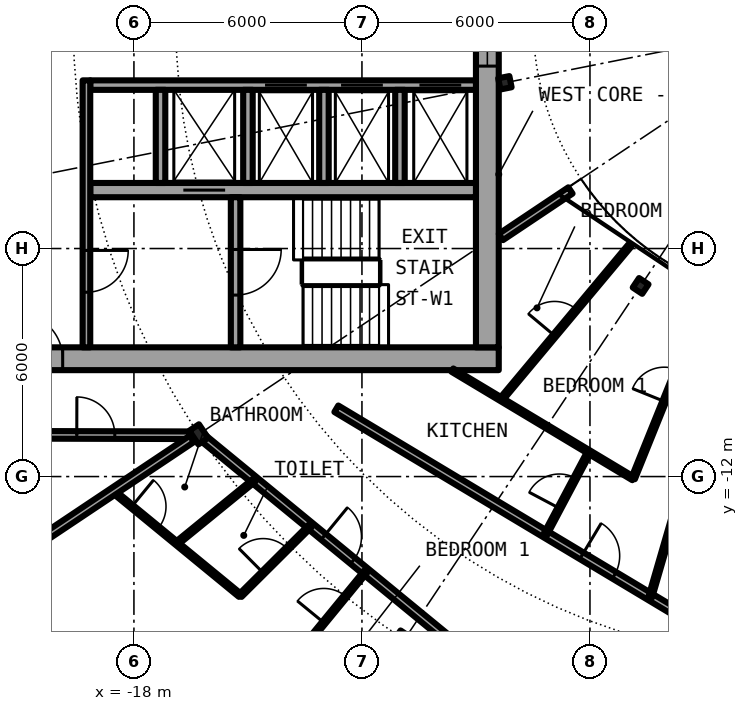
"""IFC4 building model, lengths in metres.
Left out: names, types, materials, properties, quantities, classifications, styles, units other than length and angle.
Written with IfcOpenShell. Run it as: python <this file> out.ifc"""

import sys

from ifc_helpers import new_model, si_unit, direction, frame, frame_2d, origin, origin_2d, place, context, subcontext, project, spatial, rectangle, i_section, extrude, element, fill, save


model = new_model("IFC4")
c1 = context("Model", 3, precision=1e-05, world=origin(), true_north=direction((0.0, 1.0)))
c2 = subcontext(c1, "Body", "Model", "MODEL_VIEW")
j1 = project(units=[si_unit("LENGTHUNIT", "METRE"), si_unit("PLANEANGLEUNIT", "RADIAN")], contexts=[c1])
p1 = place(None, origin())
s1 = spatial("IfcSite", under=j1, at=p1, CompositionType="ELEMENT")
p2 = place(p1, origin())
s2 = spatial("IfcBuilding", under=s1, at=p2, CompositionType="ELEMENT")
p3 = place(p2, frame((0.0, 0.0, 129.95)))
s3 = spatial("IfcBuildingStorey", under=s2, at=p3, CompositionType="ELEMENT", Elevation=129.95)
for number, where, z_axis, x_axis in (
    (1, (-16.297, -10.889, 0.0), (0.0, 0.0, 1.0), (-0.831, -0.556, 0.0)),
    (2, (-10.889, -16.297, 0.0), (0.0, 0.0, 1.0), (-0.556, -0.831, 0.0)),
):
    element("IfcColumn", number, at=place(p3, frame(where, z_axis=z_axis, x_axis=x_axis)), inside=s3, PredefinedType="COLUMN", context=c2, shape_type="SweptSolid", body=[
        extrude(i_section(OverallWidth=0.307, OverallDepth=0.432, WebThickness=0.021, FlangeThickness=0.04, FilletRadius=0.027, at=origin_2d()), origin(), (0.0, 0.0, 1.0), 3.05),
    ])
for number, where, z_axis, x_axis in (
    (3, (-8.239, -1.639, 0.0), (0.0, 0.0, 1.0), (-0.981, -0.195, 0.0)),
    (4, (-4.667, -6.984, 0.0), (0.0, 0.0, 1.0), (-0.556, -0.831, 0.0)),
):
    element("IfcColumn", number, at=place(p3, frame(where, z_axis=z_axis, x_axis=x_axis)), inside=s3, PredefinedType="COLUMN", context=c2, shape_type="SweptSolid", body=[
        extrude(i_section(OverallWidth=0.3, OverallDepth=0.3, WebThickness=0.011, FlangeThickness=0.019, FilletRadius=0.027, at=origin_2d()), origin(), (0.0, 0.0, 1.0), 3.05),
    ])
p4 = place(p3, frame((-22.699, -15.167, 0.0), z_axis=(0.0, 0.0, 1.0), x_axis=(0.634382322723, -0.773019449054, 0.0)))
e5 = element("IfcWall", 5, at=p4, inside=s3, PredefinedType="SOLIDWALL", context=c2, shape_type="SweptSolid", body=[
    extrude(rectangle(XDim=5.352, YDim=0.25, at=frame_2d((2.676, 0.0))), origin(), (0.0, 0.0, 1.0), 2.7),
])
p5 = place(p4, frame((0.441, 0.0, 0.3)))
e6 = element("IfcOpeningElement", 6, at=p5, cuts=e5, PredefinedType="OPENING", context=c2, shape_type="SweptSolid", body=[
    extrude(rectangle(XDim=1.8, YDim=2.1, at=frame_2d((0.9, 1.05))), frame((0.0, 0.135, 0.0), z_axis=(0.0, -1.0, 0.0), x_axis=(1.0, 0.0, 0.0)), (0.0, 0.0, 1.0), 0.27),
])
p6 = place(p4, frame((3.51, 0.0, 0.0)))
e7 = element("IfcOpeningElement", 7, at=p6, cuts=e5, PredefinedType="OPENING", context=c2, shape_type="SweptSolid", body=[
    extrude(rectangle(XDim=1.0, YDim=2.2, at=frame_2d((0.5, 1.1))), frame((0.0, 0.135, 0.0), z_axis=(0.0, -1.0, 0.0), x_axis=(1.0, 0.0, 0.0)), (0.0, 0.0, 1.0), 0.27),
])
p7 = place(p3, frame((-22.2, -8.9, 0.0), z_axis=(0.0, 0.0, 1.0), x_axis=(1.0, 0.0, 0.0)))
e8 = element("IfcWall", 8, at=p7, inside=s3, PredefinedType="SHEAR", context=c2, shape_type="SweptSolid", body=[
    extrude(rectangle(XDim=13.8, YDim=0.6, at=frame_2d((6.9, 0.0))), origin(), (0.0, 0.0, 1.0), 3.05),
])
p8 = place(p7, frame((1.125, 0.0, 0.0)))
e9 = element("IfcOpeningElement", 9, at=p8, cuts=e8, PredefinedType="OPENING", context=c2, shape_type="SweptSolid", body=[
    extrude(rectangle(XDim=1.2, YDim=2.3, at=frame_2d((0.6, 1.15))), frame((0.0, 0.31, 0.0), z_axis=(0.0, -1.0, 0.0), x_axis=(1.0, 0.0, 0.0)), (0.0, 0.0, 1.0), 0.62),
])
p9 = place(p3, frame((-8.7, 8.6, 0.0), z_axis=(0.0, 0.0, 1.0), x_axis=(0.0, -1.0, 0.0)))
e10 = element("IfcWall", 10, at=p9, inside=s3, PredefinedType="SHEAR", context=c2, shape_type="SweptSolid", body=[
    extrude(rectangle(XDim=17.2, YDim=0.6, at=frame_2d((8.6, 0.0))), origin(), (0.0, 0.0, 1.0), 3.05),
])
p10 = place(p9, frame((7.4, 0.0, 0.1)))
e11 = element("IfcOpeningElement", 11, at=p10, cuts=e10, PredefinedType="OPENING", context=c2, shape_type="SweptSolid", body=[
    extrude(rectangle(XDim=2.4, YDim=2.2, at=frame_2d((1.2, 1.1))), frame((0.0, 0.31, 0.0), z_axis=(0.0, -1.0, 0.0), x_axis=(1.0, 0.0, 0.0)), (0.0, 0.0, 1.0), 0.62),
])
p11 = place(p3, frame((-9.0, -1.7, 0.0), z_axis=(0.0, 0.0, 1.0), x_axis=(-1.0, 0.0, 0.0)))
e12 = element("IfcWall", 12, at=p11, inside=s3, PredefinedType="SHEAR", context=c2, shape_type="SweptSolid", body=[
    extrude(rectangle(XDim=10.15, YDim=0.25, at=frame_2d((5.075, 0.0))), origin(), (0.0, 0.0, 1.0), 3.05),
])
p12 = place(p11, frame((0.387, 0.0, 0.0)))
e13 = element("IfcOpeningElement", 13, at=p12, cuts=e12, PredefinedType="OPENING", context=c2, shape_type="SweptSolid", body=[
    extrude(rectangle(XDim=1.1, YDim=2.3, at=frame_2d((0.55, 1.15))), frame((0.0, 0.135, 0.0), z_axis=(0.0, -1.0, 0.0), x_axis=(1.0, 0.0, 0.0)), (0.0, 0.0, 1.0), 0.27),
])
p13 = place(p11, frame((2.45, 0.0, 0.0)))
e14 = element("IfcOpeningElement", 14, at=p13, cuts=e12, PredefinedType="OPENING", context=c2, shape_type="SweptSolid", body=[
    extrude(rectangle(XDim=1.1, YDim=2.3, at=frame_2d((0.55, 1.15))), frame((0.0, 0.135, 0.0), z_axis=(0.0, -1.0, 0.0), x_axis=(1.0, 0.0, 0.0)), (0.0, 0.0, 1.0), 0.27),
])
p14 = place(p11, frame((4.45, 0.0, 0.0)))
e15 = element("IfcOpeningElement", 15, at=p14, cuts=e12, PredefinedType="OPENING", context=c2, shape_type="SweptSolid", body=[
    extrude(rectangle(XDim=1.1, YDim=2.3, at=frame_2d((0.55, 1.15))), frame((0.0, 0.135, 0.0), z_axis=(0.0, -1.0, 0.0), x_axis=(1.0, 0.0, 0.0)), (0.0, 0.0, 1.0), 0.27),
])
p15 = place(p3, frame((-9.0, -4.462, 0.0), z_axis=(0.0, 0.0, 1.0), x_axis=(-1.0, 0.0, 0.0)))
e16 = element("IfcWall", 16, at=p15, inside=s3, PredefinedType="SHEAR", context=c2, shape_type="SweptSolid", body=[
    extrude(rectangle(XDim=10.15, YDim=0.375, at=frame_2d((5.075, 0.0))), origin(), (0.0, 0.0, 1.0), 3.05),
])
p16 = place(p15, frame((6.6, 0.0, 0.0)))
e17 = element("IfcOpeningElement", 17, at=p16, cuts=e16, PredefinedType="OPENING", context=c2, shape_type="SweptSolid", body=[
    extrude(rectangle(XDim=1.1, YDim=2.3, at=frame_2d((0.55, 1.15))), frame((0.0, 0.198, 0.0), z_axis=(0.0, -1.0, 0.0), x_axis=(1.0, 0.0, 0.0)), (0.0, 0.0, 1.0), 0.395),
])
p17 = place(p3, frame((-15.325, -4.65, 0.0), z_axis=(0.0, 0.0, 1.0), x_axis=(0.0, -1.0, 0.0)))
e18 = element("IfcWall", 18, at=p17, inside=s3, PredefinedType="SHEAR", context=c2, shape_type="SweptSolid", body=[
    extrude(rectangle(XDim=3.95, YDim=0.25, at=frame_2d((1.975, 0.0))), origin(), (0.0, 0.0, 1.0), 3.05),
])
p18 = place(p17, frame((1.375, 0.0, 0.0)))
e19 = element("IfcOpeningElement", 19, at=p18, cuts=e18, PredefinedType="OPENING", context=c2, shape_type="SweptSolid", body=[
    extrude(rectangle(XDim=1.2, YDim=2.3, at=frame_2d((0.6, 1.15))), frame((0.0, 0.135, 0.0), z_axis=(0.0, -1.0, 0.0), x_axis=(1.0, 0.0, 0.0)), (0.0, 0.0, 1.0), 0.27),
])
for number, where, z_axis, x_axis in (
    (20, (-15.0, -1.825, 0.0), (0.0, 0.0, 1.0), (0.0, -1.0, 0.0)),
    (21, (-17.3, -1.825, 0.0), (0.0, 0.0, 1.0), (0.0, -1.0, 0.0)),
):
    element("IfcWall", number, at=place(p3, frame(where, z_axis=z_axis, x_axis=x_axis)), inside=s3, PredefinedType="SOLIDWALL", context=c2, shape_type="SweptSolid", body=[
        extrude(rectangle(XDim=2.45, YDim=0.25, at=frame_2d((1.225, 0.0))), origin(), (0.0, 0.0, 1.0), 2.7),
    ])
p19 = place(p3, frame((-19.25, -1.575, 0.0), z_axis=(0.0, 0.0, 1.0), x_axis=(0.0, -1.0, 0.0)))
e22 = element("IfcWall", 22, at=p19, inside=s3, PredefinedType="SOLIDWALL", context=c2, shape_type="SweptSolid", body=[
    extrude(rectangle(XDim=7.025, YDim=0.2, at=frame_2d((3.513, 0.0))), origin(), (0.0, 0.0, 1.0), 2.7),
])
p20 = place(p19, frame((4.475, 0.0, 0.0)))
e23 = element("IfcOpeningElement", 23, at=p20, cuts=e22, PredefinedType="OPENING", context=c2, shape_type="SweptSolid", body=[
    extrude(rectangle(XDim=1.1, YDim=2.3, at=frame_2d((0.55, 1.15))), frame((0.0, 0.11, 0.0), z_axis=(0.0, -1.0, 0.0), x_axis=(1.0, 0.0, 0.0)), (0.0, 0.0, 1.0), 0.22),
])
for number, where, z_axis, x_axis in (
    (24, (-11.0, -1.825, 0.0), (0.0, 0.0, 1.0), (0.0, -1.0, 0.0)),
    (25, (-13.0, -1.825, 0.0), (0.0, 0.0, 1.0), (0.0, -1.0, 0.0)),
):
    element("IfcWall", number, at=place(p3, frame(where, z_axis=z_axis, x_axis=x_axis)), inside=s3, PredefinedType="SOLIDWALL", context=c2, shape_type="SweptSolid", body=[
        extrude(rectangle(XDim=2.45, YDim=0.25, at=frame_2d((1.225, 0.0))), origin(), (0.0, 0.0, 1.0), 2.7),
    ])
p21 = place(p3, frame((-18.542, -12.389, 0.0), z_axis=(0.0, 0.0, 1.0), x_axis=(0.772975913823, -0.634435368379, 0.0)))
e26 = element("IfcWall", 26, at=p21, inside=s3, PredefinedType="PARTITIONING", context=c2, shape_type="SweptSolid", body=[
    extrude(rectangle(XDim=4.316, YDim=0.1, at=frame_2d((2.158, 0.0))), origin(), (0.0, 0.0, 1.0), 2.7),
])
p22 = place(p21, frame((0.629, 0.0, 0.0)))
e27 = element("IfcOpeningElement", 27, at=p22, cuts=e26, PredefinedType="OPENING", context=c2, shape_type="SweptSolid", body=[
    extrude(rectangle(XDim=0.9, YDim=2.3, at=frame_2d((0.45, 1.15))), frame((0.0, 0.06, 0.0), z_axis=(0.0, -1.0, 0.0), x_axis=(1.0, 0.0, 0.0)), (0.0, 0.0, 1.0), 0.12),
])
p23 = place(p3, frame((-16.173, -10.991, 0.0), z_axis=(0.0, 0.0, 1.0), x_axis=(0.773013989296, -0.634388975591, 0.0)))
e28 = element("IfcWall", 28, at=p23, inside=s3, PredefinedType="PARTITIONING", context=c2, shape_type="SweptSolid", body=[
    extrude(rectangle(XDim=11.219, YDim=0.2, at=frame_2d((5.609, 0.0))), origin(), (0.0, 0.0, 1.0), 2.39),
])
p24 = place(p23, frame((4.089, 0.0, 0.0)))
e29 = element("IfcOpeningElement", 29, at=p24, cuts=e28, PredefinedType="OPENING", context=c2, shape_type="SweptSolid", body=[
    extrude(rectangle(XDim=1.0, YDim=2.3, at=frame_2d((0.5, 1.15))), frame((0.0, 0.11, 0.0), z_axis=(0.0, -1.0, 0.0), x_axis=(1.0, 0.0, 0.0)), (0.0, 0.0, 1.0), 0.22),
])
p25 = place(p3, frame((-12.674, -10.216, 0.0), z_axis=(0.0, 0.0, 1.0), x_axis=(0.857761135463, -0.514048474844, 0.0)))
e30 = element("IfcWall", 30, at=p25, inside=s3, PredefinedType="PARTITIONING", context=c2, shape_type="SweptSolid", body=[
    extrude(rectangle(XDim=12.845, YDim=0.2, at=frame_2d((6.423, 0.0))), origin(), (0.0, 0.0, 1.0), 2.7),
])
p26 = place(p25, frame((7.527, 0.0, 0.0)))
e31 = element("IfcOpeningElement", 31, at=p26, cuts=e30, PredefinedType="OPENING", context=c2, shape_type="SweptSolid", body=[
    extrude(rectangle(XDim=1.0, YDim=2.3, at=frame_2d((0.5, 1.15))), frame((0.0, 0.11, 0.0), z_axis=(0.0, -1.0, 0.0), x_axis=(1.0, 0.0, 0.0)), (0.0, 0.0, 1.0), 0.22),
])
p27 = place(p3, frame((-9.621, -9.199, 0.0), z_axis=(0.0, 0.0, 1.0), x_axis=(0.857698539053, -0.514152911211, 0.0)))
e32 = element("IfcWall", 32, at=p27, inside=s3, PredefinedType="PARTITIONING", context=c2, shape_type="SweptSolid", body=[
    extrude(rectangle(XDim=5.551, YDim=0.1, at=frame_2d((2.775, 0.0))), origin(), (0.0, 0.0, 1.0), 2.7),
])
p28 = place(p3, frame((-21.675, -10.9, 0.0), z_axis=(0.0, 0.0, 1.0), x_axis=(0.99999670426, -0.002567385634, 0.0)))
e33 = element("IfcWall", 33, at=p28, inside=s3, PredefinedType="PARTITIONING", context=c2, shape_type="SweptSolid", body=[
    extrude(rectangle(XDim=5.135, YDim=0.2, at=frame_2d((2.567, 0.0))), origin(), (0.0, 0.0, 1.0), 2.7),
])
p29 = place(p28, frame((2.171, 0.0, 0.0)))
e34 = element("IfcOpeningElement", 34, at=p29, cuts=e33, PredefinedType="OPENING", context=c2, shape_type="SweptSolid", body=[
    extrude(rectangle(XDim=1.0, YDim=2.3, at=frame_2d((0.5, 1.15))), frame((0.0, 0.11, 0.0), z_axis=(0.0, -1.0, 0.0), x_axis=(1.0, 0.0, 0.0)), (0.0, 0.0, 1.0), 0.22),
])
p30 = place(p3, frame((-6.513, -4.472, 0.0), z_axis=(0.0, 0.0, 1.0), x_axis=(-0.831333375071, -0.555774072347, 0.0)))
e35 = element("IfcWall", 35, at=p30, inside=s3, PredefinedType="PARTITIONING", context=c2, shape_type="SweptSolid", body=[
    extrude(rectangle(XDim=2.203, YDim=0.2, at=frame_2d((1.101, 0.0))), origin(), (0.0, 0.0, 1.0), 2.7),
])
p31 = place(p3, frame((-22.595, -15.097, 0.0), z_axis=(0.0, 0.0, 1.0), x_axis=(0.831467903109, 0.555572791, 0.0)))
e36 = element("IfcWall", 36, at=p31, inside=s3, PredefinedType="PARTITIONING", context=c2, shape_type="SweptSolid", body=[
    extrude(rectangle(XDim=7.358, YDim=0.2, at=frame_2d((3.679, 0.0))), origin(), (0.0, 0.0, 1.0), 2.7),
])
p32 = place(p3, frame((-17.24, -21.007, 0.0), z_axis=(0.0, 0.0, 1.0), x_axis=(0.634396151441, 0.77300810024, 0.0)))
e37 = element("IfcWall", 37, at=p32, inside=s3, PredefinedType="PARTITIONING", context=c2, shape_type="SweptSolid", body=[
    extrude(rectangle(XDim=8.419, YDim=0.1, at=frame_2d((4.209, 0.0))), origin(), (0.0, 0.0, 1.0), 2.7),
])
p33 = place(p32, frame((6.679, 0.0, 0.0)))
e38 = element("IfcOpeningElement", 38, at=p33, cuts=e37, PredefinedType="OPENING", context=c2, shape_type="SweptSolid", body=[
    extrude(rectangle(XDim=0.9, YDim=2.3, at=frame_2d((0.45, 1.15))), frame((0.0, 0.06, 0.0), z_axis=(0.0, -1.0, 0.0), x_axis=(1.0, 0.0, 0.0)), (0.0, 0.0, 1.0), 0.12),
])
p34 = place(p32, frame((2.468, 0.0, 0.0)))
e39 = element("IfcOpeningElement", 39, at=p34, cuts=e37, PredefinedType="OPENING", context=c2, shape_type="SweptSolid", body=[
    extrude(rectangle(XDim=0.9, YDim=2.3, at=frame_2d((0.45, 1.15))), frame((0.0, 0.06, 0.0), z_axis=(0.0, -1.0, 0.0), x_axis=(1.0, 0.0, 0.0)), (0.0, 0.0, 1.0), 0.12),
])
p35 = place(p3, frame((-16.874, -13.758, 0.0), z_axis=(0.0, 0.0, 1.0), x_axis=(0.774979608522, 0.631986239072, 0.0)))
e40 = element("IfcWall", 40, at=p35, inside=s3, PredefinedType="PARTITIONING", context=c2, shape_type="SweptSolid", body=[
    extrude(rectangle(XDim=2.636, YDim=0.1, at=frame_2d((1.318, 0.0))), origin(), (0.0, 0.0, 1.0), 2.7),
])
p36 = place(p3, frame((-15.202, -15.131, 0.0), z_axis=(0.0, 0.0, 1.0), x_axis=(0.708796844581, 0.705412668665, 0.0)))
e41 = element("IfcWall", 41, at=p36, inside=s3, PredefinedType="PARTITIONING", context=c2, shape_type="SweptSolid", body=[
    extrude(rectangle(XDim=2.597, YDim=0.1, at=frame_2d((1.299, 0.0))), origin(), (0.0, 0.0, 1.0), 2.7),
])
p37 = place(p36, frame((0.849, 0.0, 0.0)))
e42 = element("IfcOpeningElement", 42, at=p37, cuts=e41, PredefinedType="OPENING", context=c2, shape_type="SweptSolid", body=[
    extrude(rectangle(XDim=0.9, YDim=2.3, at=frame_2d((0.45, 1.15))), frame((0.0, 0.06, 0.0), z_axis=(0.0, -1.0, 0.0), x_axis=(1.0, 0.0, 0.0)), (0.0, 0.0, 1.0), 0.12),
])
p38 = place(p3, frame((-8.335, -9.97, 0.0), z_axis=(0.0, 0.0, 1.0), x_axis=(0.641376424834, 0.767226356213, 0.0)))
e43 = element("IfcWall", 43, at=p38, inside=s3, PredefinedType="PARTITIONING", context=c2, shape_type="SweptSolid", body=[
    extrude(rectangle(XDim=5.275, YDim=0.1, at=frame_2d((2.637, 0.0))), origin(), (0.0, 0.0, 1.0), 2.7),
])
p39 = place(p38, frame((2.187, 0.0, 0.0)))
e44 = element("IfcOpeningElement", 44, at=p39, cuts=e43, PredefinedType="OPENING", context=c2, shape_type="SweptSolid", body=[
    extrude(rectangle(XDim=0.9, YDim=2.3, at=frame_2d((0.45, 1.15))), frame((0.0, 0.06, 0.0), z_axis=(0.0, -1.0, 0.0), x_axis=(1.0, 0.0, 0.0)), (0.0, 0.0, 1.0), 0.12),
])
p40 = place(p3, frame((-7.169, -13.516, 0.0), z_axis=(0.0, 0.0, 1.0), x_axis=(0.468649029236, 0.883384450506, 0.0)))
e45 = element("IfcWall", 45, at=p40, inside=s3, PredefinedType="PARTITIONING", context=c2, shape_type="SweptSolid", body=[
    extrude(rectangle(XDim=2.445, YDim=0.1, at=frame_2d((1.223, 0.0))), origin(), (0.0, 0.0, 1.0), 2.7),
])
p41 = place(p40, frame((0.773, 0.0, 0.0)))
e46 = element("IfcOpeningElement", 46, at=p41, cuts=e45, PredefinedType="OPENING", context=c2, shape_type="SweptSolid", body=[
    extrude(rectangle(XDim=0.9, YDim=2.3, at=frame_2d((0.45, 1.15))), frame((0.0, 0.06, 0.0), z_axis=(0.0, -1.0, 0.0), x_axis=(1.0, 0.0, 0.0)), (0.0, 0.0, 1.0), 0.12),
])
p42 = place(p3, frame((-4.864, -12.051, 0.0), z_axis=(0.0, 0.0, 1.0), x_axis=(0.374372761824, 0.927278294367, 0.0)))
e47 = element("IfcWall", 47, at=p42, inside=s3, PredefinedType="PARTITIONING", context=c2, shape_type="SweptSolid", body=[
    extrude(rectangle(XDim=5.276, YDim=0.1, at=frame_2d((2.638, 0.0))), origin(), (0.0, 0.0, 1.0), 2.7),
])
p43 = place(p42, frame((2.188, 0.0, 0.0)))
e48 = element("IfcOpeningElement", 48, at=p43, cuts=e47, PredefinedType="OPENING", context=c2, shape_type="SweptSolid", body=[
    extrude(rectangle(XDim=0.9, YDim=2.3, at=frame_2d((0.45, 1.15))), frame((0.0, 0.06, 0.0), z_axis=(0.0, -1.0, 0.0), x_axis=(1.0, 0.0, 0.0)), (0.0, 0.0, 1.0), 0.12),
])
p44 = place(p3, frame((-4.411, -15.168, 0.0), z_axis=(0.0, 0.0, 1.0), x_axis=(0.279201466266, 0.960232545395, 0.0)))
e49 = element("IfcWall", 49, at=p44, inside=s3, PredefinedType="PARTITIONING", context=c2, shape_type="SweptSolid", body=[
    extrude(rectangle(XDim=2.524, YDim=0.1, at=frame_2d((1.262, 0.0))), origin(), (0.0, 0.0, 1.0), 2.7),
])
p45 = place(p12, origin())
e50 = element("IfcDoor", 50, at=p45, inside=s3, OperationType="DOUBLE_DOOR_SLIDING", PredefinedType="DOOR", context=c2, shape_type="SweptSolid", body=[
    extrude(rectangle(XDim=1.1, YDim=2.3, at=frame_2d((0.55, 1.15))), frame((0.0, 0.025, 0.0), z_axis=(0.0, -1.0, 0.0), x_axis=(1.0, 0.0, 0.0)), (0.0, 0.0, 1.0), 0.05),
])
fill(e13, e50)
p46 = place(p13, origin())
e51 = element("IfcDoor", 51, at=p46, inside=s3, OperationType="DOUBLE_DOOR_SLIDING", PredefinedType="DOOR", context=c2, shape_type="SweptSolid", body=[
    extrude(rectangle(XDim=1.1, YDim=2.3, at=frame_2d((0.55, 1.15))), frame((0.0, 0.025, 0.0), z_axis=(0.0, -1.0, 0.0), x_axis=(1.0, 0.0, 0.0)), (0.0, 0.0, 1.0), 0.05),
])
fill(e14, e51)
p47 = place(p14, origin())
e52 = element("IfcDoor", 52, at=p47, inside=s3, OperationType="DOUBLE_DOOR_SLIDING", PredefinedType="DOOR", context=c2, shape_type="SweptSolid", body=[
    extrude(rectangle(XDim=1.1, YDim=2.3, at=frame_2d((0.55, 1.15))), frame((0.0, 0.025, 0.0), z_axis=(0.0, -1.0, 0.0), x_axis=(1.0, 0.0, 0.0)), (0.0, 0.0, 1.0), 0.05),
])
fill(e15, e52)
p48 = place(p16, origin())
e53 = element("IfcDoor", 53, at=p48, inside=s3, OperationType="DOUBLE_DOOR_SLIDING", PredefinedType="DOOR", context=c2, shape_type="SweptSolid", body=[
    extrude(rectangle(XDim=1.1, YDim=2.3, at=frame_2d((0.55, 1.15))), frame((0.0, 0.025, 0.0), z_axis=(0.0, -1.0, 0.0), x_axis=(1.0, 0.0, 0.0)), (0.0, 0.0, 1.0), 0.05),
])
fill(e17, e53)
p49 = place(p18, origin())
e54 = element("IfcDoor", 54, at=p49, inside=s3, OperationType="SINGLE_SWING_LEFT", PredefinedType="DOOR", context=c2, shape_type="SweptSolid", body=[
    extrude(rectangle(XDim=1.2, YDim=2.3, at=frame_2d((0.6, 1.15))), frame((0.0, 0.025, 0.0), z_axis=(0.0, -1.0, 0.0), x_axis=(1.0, 0.0, 0.0)), (0.0, 0.0, 1.0), 0.05),
])
fill(e19, e54)
p50 = place(p20, origin())
e55 = element("IfcDoor", 55, at=p50, inside=s3, OperationType="SINGLE_SWING_LEFT", PredefinedType="DOOR", context=c2, shape_type="SweptSolid", body=[
    extrude(rectangle(XDim=1.1, YDim=2.3, at=frame_2d((0.55, 1.15))), frame((0.0, 0.025, 0.0), z_axis=(0.0, -1.0, 0.0), x_axis=(1.0, 0.0, 0.0)), (0.0, 0.0, 1.0), 0.05),
])
fill(e23, e55)
p51 = place(p8, origin())
e56 = element("IfcDoor", 56, at=p51, inside=s3, OperationType="SINGLE_SWING_RIGHT", PredefinedType="DOOR", context=c2, shape_type="SweptSolid", body=[
    extrude(rectangle(XDim=1.2, YDim=2.3, at=frame_2d((0.6, 1.15))), frame((0.0, 0.025, 0.0), z_axis=(0.0, -1.0, 0.0), x_axis=(1.0, 0.0, 0.0)), (0.0, 0.0, 1.0), 0.05),
])
fill(e9, e56)
p52 = place(p10, origin())
e57 = element("IfcWindow", 57, at=p52, inside=s3, PartitioningType="SINGLE_PANEL", PredefinedType="WINDOW", context=c2, shape_type="SweptSolid", body=[
    extrude(rectangle(XDim=2.4, YDim=2.2, at=frame_2d((1.2, 1.1))), frame((0.0, 0.03, 0.0), z_axis=(0.0, -1.0, 0.0), x_axis=(1.0, 0.0, 0.0)), (0.0, 0.0, 1.0), 0.06),
])
fill(e11, e57)
p53 = place(p24, origin())
e58 = element("IfcDoor", 58, at=p53, inside=s3, OperationType="SINGLE_SWING_LEFT", PredefinedType="DOOR", context=c2, shape_type="SweptSolid", body=[
    extrude(rectangle(XDim=1.0, YDim=2.3, at=frame_2d((0.5, 1.15))), frame((0.0, 0.025, 0.0), z_axis=(0.0, -1.0, 0.0), x_axis=(1.0, 0.0, 0.0)), (0.0, 0.0, 1.0), 0.05),
])
fill(e29, e58)
p54 = place(p22, origin())
e59 = element("IfcDoor", 59, at=p54, inside=s3, OperationType="SINGLE_SWING_LEFT", PredefinedType="DOOR", context=c2, shape_type="SweptSolid", body=[
    extrude(rectangle(XDim=0.9, YDim=2.3, at=frame_2d((0.45, 1.15))), frame((0.0, 0.025, 0.0), z_axis=(0.0, -1.0, 0.0), x_axis=(1.0, 0.0, 0.0)), (0.0, 0.0, 1.0), 0.05),
])
fill(e27, e59)
p55 = place(p37, origin())
e60 = element("IfcDoor", 60, at=p55, inside=s3, OperationType="SINGLE_SWING_LEFT", PredefinedType="DOOR", context=c2, shape_type="SweptSolid", body=[
    extrude(rectangle(XDim=0.9, YDim=2.3, at=frame_2d((0.45, 1.15))), frame((0.0, 0.025, 0.0), z_axis=(0.0, -1.0, 0.0), x_axis=(1.0, 0.0, 0.0)), (0.0, 0.0, 1.0), 0.05),
])
fill(e42, e60)
p56 = place(p33, origin())
e61 = element("IfcDoor", 61, at=p56, inside=s3, OperationType="SINGLE_SWING_RIGHT", PredefinedType="DOOR", context=c2, shape_type="SweptSolid", body=[
    extrude(rectangle(XDim=0.9, YDim=2.3, at=frame_2d((0.45, 1.15))), frame((0.0, 0.025, 0.0), z_axis=(0.0, -1.0, 0.0), x_axis=(1.0, 0.0, 0.0)), (0.0, 0.0, 1.0), 0.05),
])
fill(e38, e61)
p57 = place(p26, origin())
e62 = element("IfcDoor", 62, at=p57, inside=s3, OperationType="SINGLE_SWING_RIGHT", PredefinedType="DOOR", context=c2, shape_type="SweptSolid", body=[
    extrude(rectangle(XDim=1.0, YDim=2.3, at=frame_2d((0.5, 1.15))), frame((0.0, 0.025, 0.0), z_axis=(0.0, -1.0, 0.0), x_axis=(1.0, 0.0, 0.0)), (0.0, 0.0, 1.0), 0.05),
])
fill(e31, e62)
p58 = place(p41, origin())
e63 = element("IfcDoor", 63, at=p58, inside=s3, OperationType="SINGLE_SWING_RIGHT", PredefinedType="DOOR", context=c2, shape_type="SweptSolid", body=[
    extrude(rectangle(XDim=0.9, YDim=2.3, at=frame_2d((0.45, 1.15))), frame((0.0, 0.025, 0.0), z_axis=(0.0, -1.0, 0.0), x_axis=(1.0, 0.0, 0.0)), (0.0, 0.0, 1.0), 0.05),
])
fill(e46, e63)
p59 = place(p43, origin())
e64 = element("IfcDoor", 64, at=p59, inside=s3, OperationType="SINGLE_SWING_RIGHT", PredefinedType="DOOR", context=c2, shape_type="SweptSolid", body=[
    extrude(rectangle(XDim=0.9, YDim=2.3, at=frame_2d((0.45, 1.15))), frame((0.0, 0.025, 0.0), z_axis=(0.0, -1.0, 0.0), x_axis=(1.0, 0.0, 0.0)), (0.0, 0.0, 1.0), 0.05),
])
fill(e48, e64)
p60 = place(p39, origin())
e65 = element("IfcDoor", 65, at=p60, inside=s3, OperationType="SINGLE_SWING_RIGHT", PredefinedType="DOOR", context=c2, shape_type="SweptSolid", body=[
    extrude(rectangle(XDim=0.9, YDim=2.3, at=frame_2d((0.45, 1.15))), frame((0.0, 0.025, 0.0), z_axis=(0.0, -1.0, 0.0), x_axis=(1.0, 0.0, 0.0)), (0.0, 0.0, 1.0), 0.05),
])
fill(e44, e65)
p61 = place(p29, origin())
e66 = element("IfcDoor", 66, at=p61, inside=s3, OperationType="SINGLE_SWING_RIGHT", PredefinedType="DOOR", context=c2, shape_type="SweptSolid", body=[
    extrude(rectangle(XDim=1.0, YDim=2.3, at=frame_2d((0.5, 1.15))), frame((0.0, 0.025, 0.0), z_axis=(0.0, -1.0, 0.0), x_axis=(1.0, 0.0, 0.0)), (0.0, 0.0, 1.0), 0.05),
])
fill(e34, e66)
save(model, sys.argv[1])
